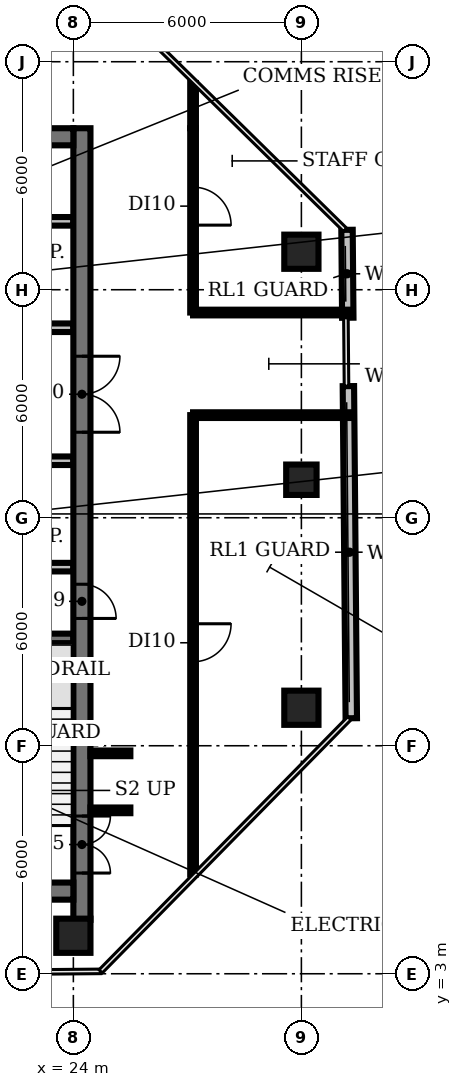
"""IFC4 building model, lengths in metres.
Left out: names, types, materials, properties, quantities, classifications, styles, units other than length and angle.
Written with IfcOpenShell. Run it as: python <this file> out.ifc"""

import sys

from ifc_helpers import new_model, si_unit, direction, frame, frame_2d, origin, origin_2d, place, context, subcontext, project, spatial, rectangle, circle, extrude, element, fill, save


model = new_model("IFC4")
c1 = context("Model", 3, precision=1e-05, world=origin(), true_north=direction((0.0, 1.0)))
c2 = subcontext(c1, "Body", "Model", "MODEL_VIEW")
j1 = project(units=[si_unit("LENGTHUNIT", "METRE"), si_unit("PLANEANGLEUNIT", "RADIAN")], contexts=[c1])
p1 = place(None, origin())
s1 = spatial("IfcSite", under=j1, at=p1, CompositionType="ELEMENT")
p2 = place(p1, origin())
s2 = spatial("IfcBuilding", under=s1, at=p2, CompositionType="ELEMENT")
p3 = place(p2, frame((0.0, 0.0, 226.4)))
s3 = spatial("IfcBuildingStorey", under=s2, at=p3, CompositionType="ELEMENT", Elevation=226.4)
for number, where, z_axis, x_axis in (
    (1, (24.0, 4.0, 0.0), (0.0, 0.0, 1.0), (1.0, 0.0, 0.0)),
    (2, (30.0, 10.0, 0.0), (0.0, 0.0, 1.0), (1.0, 0.0, 0.0)),
):
    element("IfcColumn", number, at=place(p3, frame(where, z_axis=z_axis, x_axis=x_axis)), inside=s3, PredefinedType="COLUMN", context=c2, shape_type="SweptSolid", body=[
        extrude(circle(Radius=0.45, at=origin_2d()), origin(), (0.0, 0.0, 1.0), 3.85),
    ])
p4 = place(p3, frame((30.0, 16.0, 0.0), z_axis=(0.0, 0.0, 1.0), x_axis=(1.0, 0.0, 0.0)))
e3 = element("IfcColumn", 3, at=p4, inside=s3, PredefinedType="COLUMN", context=c2, shape_type="SweptSolid", body=[
    extrude(rectangle(XDim=0.8, YDim=0.8, at=origin_2d()), origin(), (0.0, 0.0, 1.0), 3.85),
])
p5 = place(p3, frame((30.0, 22.0, 0.0), z_axis=(0.0, 0.0, 1.0), x_axis=(1.0, 0.0, 0.0)))
e4 = element("IfcColumn", 4, at=p5, inside=s3, PredefinedType="COLUMN", context=c2, shape_type="SweptSolid", body=[
    extrude(circle(Radius=0.45, at=origin_2d()), origin(), (0.0, 0.0, 1.0), 3.85),
])
p6 = place(p3, frame((31.313, 9.724, 0.0), z_axis=(0.0, 0.0, 1.0), x_axis=(-0.008715239699, 0.999962021577, 0.0)))
e5 = element("IfcWall", 5, at=p6, inside=s3, PredefinedType="SOLIDWALL", context=c2, shape_type="SweptSolid", body=[
    extrude(rectangle(XDim=8.74, YDim=0.3, at=frame_2d((4.37, 0.0))), origin(), (0.0, 0.0, 1.0), 3.85),
])
p7 = place(p3, frame((31.221, 20.263, 0.0), z_axis=(0.0, 0.0, 1.0), x_axis=(-0.008654029484, 0.999962553186, 0.0)))
e6 = element("IfcWall", 6, at=p7, inside=s3, PredefinedType="SOLIDWALL", context=c2, shape_type="SweptSolid", body=[
    extrude(rectangle(XDim=2.313, YDim=0.3, at=frame_2d((1.157, 0.0))), origin(), (0.0, 0.0, 1.0), 3.85),
])
p8 = place(p3, frame((20.85, 11.825, 0.0), z_axis=(0.0, 0.0, 1.0), x_axis=(1.0, 0.0, 0.0)))
e7 = element("IfcWall", 7, at=p8, inside=s3, PredefinedType="SHEAR", context=c2, shape_type="SweptSolid", body=[
    extrude(rectangle(XDim=3.15, YDim=0.25, at=frame_2d((1.575, 0.0))), origin(), (0.0, 0.0, 1.0), 3.85),
])
p9 = place(p3, frame((16.6, 13.7, 0.0), z_axis=(0.0, 0.0, 1.0), x_axis=(1.0, 0.0, 0.0)))
e8 = element("IfcWall", 8, at=p9, inside=s3, PredefinedType="PARTITIONING", context=c2, shape_type="SweptSolid", body=[
    extrude(rectangle(XDim=7.4, YDim=0.225, at=frame_2d((3.7, 0.0))), origin(), (0.0, 0.0, 1.0), 3.85),
])
p10 = place(p3, frame((9.4, 16.5, 0.0), z_axis=(0.0, 0.0, 1.0), x_axis=(1.0, 0.0, 0.0)))
e9 = element("IfcWall", 9, at=p10, inside=s3, PredefinedType="PARTITIONING", context=c2, shape_type="SweptSolid", body=[
    extrude(rectangle(XDim=14.6, YDim=0.225, at=frame_2d((7.3, 0.0))), origin(), (0.0, 0.0, 1.0), 3.85),
])
p11 = place(p10, frame((0.85, 0.0, 0.0)))
e10 = element("IfcOpeningElement", 10, at=p11, cuts=e9, PredefinedType="OPENING", context=c2, shape_type="SweptSolid", body=[
    extrude(rectangle(XDim=0.9, YDim=2.1, at=frame_2d((0.45, 1.05))), frame((0.0, 0.123, 0.0), z_axis=(0.0, -1.0, 0.0), x_axis=(1.0, 0.0, 0.0)), (0.0, 0.0, 1.0), 0.245),
])
p12 = place(p10, frame((3.625, 0.0, 0.0)))
e11 = element("IfcOpeningElement", 11, at=p12, cuts=e9, PredefinedType="OPENING", context=c2, shape_type="SweptSolid", body=[
    extrude(rectangle(XDim=0.9, YDim=2.1, at=frame_2d((0.45, 1.05))), frame((0.0, 0.123, 0.0), z_axis=(0.0, -1.0, 0.0), x_axis=(1.0, 0.0, 0.0)), (0.0, 0.0, 1.0), 0.245),
])
p13 = place(p10, frame((7.775, 0.0, 0.0)))
e12 = element("IfcOpeningElement", 12, at=p13, cuts=e9, PredefinedType="OPENING", context=c2, shape_type="SweptSolid", body=[
    extrude(rectangle(XDim=1.0, YDim=2.1, at=frame_2d((0.5, 1.05))), frame((0.0, 0.123, 0.0), z_axis=(0.0, -1.0, 0.0), x_axis=(1.0, 0.0, 0.0)), (0.0, 0.0, 1.0), 0.245),
])
p14 = place(p10, frame((12.4, 0.0, 0.0)))
e13 = element("IfcOpeningElement", 13, at=p14, cuts=e9, PredefinedType="OPENING", context=c2, shape_type="SweptSolid", body=[
    extrude(rectangle(XDim=1.0, YDim=2.1, at=frame_2d((0.5, 1.05))), frame((0.0, 0.123, 0.0), z_axis=(0.0, -1.0, 0.0), x_axis=(1.0, 0.0, 0.0)), (0.0, 0.0, 1.0), 0.245),
])
p15 = place(p3, frame((24.0, 20.0, 0.0), z_axis=(0.0, 0.0, 1.0), x_axis=(-1.0, 0.0, 0.0)))
e14 = element("IfcWall", 14, at=p15, inside=s3, PredefinedType="PARTITIONING", context=c2, shape_type="SweptSolid", body=[
    extrude(rectangle(XDim=14.6, YDim=0.225, at=frame_2d((7.3, 0.0))), origin(), (0.0, 0.0, 1.0), 3.85),
])
p16 = place(p15, frame((12.75, 0.0, 0.0)))
e15 = element("IfcOpeningElement", 15, at=p16, cuts=e14, PredefinedType="OPENING", context=c2, shape_type="SweptSolid", body=[
    extrude(rectangle(XDim=1.1, YDim=2.1, at=frame_2d((0.55, 1.05))), frame((0.0, 0.123, 0.0), z_axis=(0.0, -1.0, 0.0), x_axis=(1.0, 0.0, 0.0)), (0.0, 0.0, 1.0), 0.245),
])
p17 = place(p15, frame((9.95, 0.0, 0.0)))
e16 = element("IfcOpeningElement", 16, at=p17, cuts=e14, PredefinedType="OPENING", context=c2, shape_type="SweptSolid", body=[
    extrude(rectangle(XDim=1.1, YDim=2.1, at=frame_2d((0.55, 1.05))), frame((0.0, 0.123, 0.0), z_axis=(0.0, -1.0, 0.0), x_axis=(1.0, 0.0, 0.0)), (0.0, 0.0, 1.0), 0.245),
])
p18 = place(p15, frame((7.15, 0.0, 0.0)))
e17 = element("IfcOpeningElement", 17, at=p18, cuts=e14, PredefinedType="OPENING", context=c2, shape_type="SweptSolid", body=[
    extrude(rectangle(XDim=1.1, YDim=2.1, at=frame_2d((0.55, 1.05))), frame((0.0, 0.123, 0.0), z_axis=(0.0, -1.0, 0.0), x_axis=(1.0, 0.0, 0.0)), (0.0, 0.0, 1.0), 0.245),
])
p19 = place(p15, frame((4.35, 0.0, 0.0)))
e18 = element("IfcOpeningElement", 18, at=p19, cuts=e14, PredefinedType="OPENING", context=c2, shape_type="SweptSolid", body=[
    extrude(rectangle(XDim=1.1, YDim=2.1, at=frame_2d((0.55, 1.05))), frame((0.0, 0.123, 0.0), z_axis=(0.0, -1.0, 0.0), x_axis=(1.0, 0.0, 0.0)), (0.0, 0.0, 1.0), 0.245),
])
p20 = place(p15, frame((1.2, 0.0, 0.0)))
e19 = element("IfcOpeningElement", 19, at=p20, cuts=e14, PredefinedType="OPENING", context=c2, shape_type="SweptSolid", body=[
    extrude(rectangle(XDim=1.0, YDim=2.1, at=frame_2d((0.5, 1.05))), frame((0.0, 0.123, 0.0), z_axis=(0.0, -1.0, 0.0), x_axis=(1.0, 0.0, 0.0)), (0.0, 0.0, 1.0), 0.245),
])
p21 = place(p3, frame((9.4, 22.8, 0.0), z_axis=(0.0, 0.0, 1.0), x_axis=(1.0, 0.0, 0.0)))
e20 = element("IfcWall", 20, at=p21, inside=s3, PredefinedType="PARTITIONING", context=c2, shape_type="SweptSolid", body=[
    extrude(rectangle(XDim=14.6, YDim=0.225, at=frame_2d((7.3, 0.0))), origin(), (0.0, 0.0, 1.0), 3.85),
])
p22 = place(p3, frame((24.225, 25.25, 0.0), z_axis=(0.0, 0.0, 1.0), x_axis=(0.0, -1.0, 0.0)))
e21 = element("IfcWall", 21, at=p22, inside=s3, PredefinedType="SHEAR", context=c2, shape_type="SweptSolid", body=[
    extrude(rectangle(XDim=20.83, YDim=0.45, at=frame_2d((10.415, 0.0))), origin(), (0.0, 0.0, 1.0), 3.85),
])
p23 = place(p22, frame((18.1, 0.0, 0.0)))
e22 = element("IfcOpeningElement", 22, at=p23, cuts=e21, PredefinedType="OPENING", context=c2, shape_type="SweptSolid", body=[
    extrude(rectangle(XDim=1.5, YDim=2.1, at=frame_2d((0.75, 1.05))), frame((0.0, 0.235, 0.0), z_axis=(0.0, -1.0, 0.0), x_axis=(1.0, 0.0, 0.0)), (0.0, 0.0, 1.0), 0.47),
])
p24 = place(p22, frame((12.0, 0.0, 0.0)))
e23 = element("IfcOpeningElement", 23, at=p24, cuts=e21, PredefinedType="OPENING", context=c2, shape_type="SweptSolid", body=[
    extrude(rectangle(XDim=0.9, YDim=2.1, at=frame_2d((0.45, 1.05))), frame((0.0, 0.235, 0.0), z_axis=(0.0, -1.0, 0.0), x_axis=(1.0, 0.0, 0.0)), (0.0, 0.0, 1.0), 0.47),
])
p25 = place(p22, frame((6.0, 0.0, 0.0)))
e24 = element("IfcOpeningElement", 24, at=p25, cuts=e21, PredefinedType="OPENING", context=c2, shape_type="SweptSolid", body=[
    extrude(rectangle(XDim=2.0, YDim=2.1, at=frame_2d((1.0, 1.05))), frame((0.0, 0.235, 0.0), z_axis=(0.0, -1.0, 0.0), x_axis=(1.0, 0.0, 0.0)), (0.0, 0.0, 1.0), 0.47),
])
p26 = place(p3, frame((24.0, 5.175, 0.0), z_axis=(0.0, 0.0, 1.0), x_axis=(-1.0, 0.0, 0.0)))
e25 = element("IfcWall", 25, at=p26, inside=s3, PredefinedType="SHEAR", context=c2, shape_type="SweptSolid", body=[
    extrude(rectangle(XDim=18.0, YDim=0.45, at=frame_2d((9.0, 0.0))), origin(), (0.0, 0.0, 1.0), 3.85),
])
p27 = place(p26, frame((0.825, 0.0, 0.0)))
e26 = element("IfcOpeningElement", 26, at=p27, cuts=e25, PredefinedType="OPENING", context=c2, shape_type="SweptSolid", body=[
    extrude(rectangle(XDim=1.5, YDim=2.1, at=frame_2d((0.75, 1.05))), frame((0.0, 0.235, 0.0), z_axis=(0.0, -1.0, 0.0), x_axis=(1.0, 0.0, 0.0)), (0.0, 0.0, 1.0), 0.47),
])
p28 = place(p26, frame((15.675, 0.0, 0.0)))
e27 = element("IfcOpeningElement", 27, at=p28, cuts=e25, PredefinedType="OPENING", context=c2, shape_type="SweptSolid", body=[
    extrude(rectangle(XDim=1.5, YDim=2.1, at=frame_2d((0.75, 1.05))), frame((0.0, 0.235, 0.0), z_axis=(0.0, -1.0, 0.0), x_axis=(1.0, 0.0, 0.0)), (0.0, 0.0, 1.0), 0.47),
])
p29 = place(p26, frame((13.0, 0.0, 0.0)))
e28 = element("IfcOpeningElement", 28, at=p29, cuts=e25, PredefinedType="OPENING", context=c2, shape_type="SweptSolid", body=[
    extrude(rectangle(XDim=1.2, YDim=2.1, at=frame_2d((0.6, 1.05))), frame((0.0, 0.235, 0.0), z_axis=(0.0, -1.0, 0.0), x_axis=(1.0, 0.0, 0.0)), (0.0, 0.0, 1.0), 0.47),
])
p30 = place(p26, frame((4.4, 0.0, 0.0)))
e29 = element("IfcOpeningElement", 29, at=p30, cuts=e25, PredefinedType="OPENING", context=c2, shape_type="SweptSolid", body=[
    extrude(rectangle(XDim=1.0, YDim=2.1, at=frame_2d((0.5, 1.05))), frame((0.0, 0.235, 0.0), z_axis=(0.0, -1.0, 0.0), x_axis=(1.0, 0.0, 0.0)), (0.0, 0.0, 1.0), 0.47),
])
p31 = place(p3, frame((6.0, 25.025, 0.0), z_axis=(0.0, 0.0, 1.0), x_axis=(1.0, 0.0, 0.0)))
e30 = element("IfcWall", 30, at=p31, inside=s3, PredefinedType="SHEAR", context=c2, shape_type="SweptSolid", body=[
    extrude(rectangle(XDim=18.0, YDim=0.45, at=frame_2d((9.0, 0.0))), origin(), (0.0, 0.0, 1.0), 3.85),
])
for number, where, z_axis, x_axis in (
    (31, (24.45, 7.3, 0.0), (0.0, 0.0, 1.0), (1.0, 0.0, 0.0)),
    (32, (24.45, 8.8, 0.0), (0.0, 0.0, 1.0), (1.0, 0.0, 0.0)),
):
    element("IfcWall", number, at=place(p3, frame(where, z_axis=z_axis, x_axis=x_axis)), inside=s3, PredefinedType="PARTITIONING", context=c2, shape_type="SweptSolid", body=[
        extrude(rectangle(XDim=1.05, YDim=0.15, at=frame_2d((0.525, 0.0))), origin(), (0.0, 0.0, 1.0), 2.88),
    ])
p32 = place(p3, frame((27.15, 17.7, 0.0), z_axis=(0.0, 0.0, 1.0), x_axis=(0.0, -1.0, 0.0)))
e33 = element("IfcWall", 33, at=p32, inside=s3, PredefinedType="PARTITIONING", context=c2, shape_type="SweptSolid", body=[
    extrude(rectangle(XDim=12.09, YDim=0.15, at=frame_2d((6.045, 0.0))), origin(), (0.0, 0.0, 1.0), 2.88),
])
p33 = place(p32, frame((5.49, 0.0, 0.0)))
e34 = element("IfcOpeningElement", 34, at=p33, cuts=e33, PredefinedType="OPENING", context=c2, shape_type="SweptSolid", body=[
    extrude(rectangle(XDim=1.0, YDim=2.1, at=frame_2d((0.5, 1.05))), frame((0.0, 0.085, 0.0), z_axis=(0.0, -1.0, 0.0), x_axis=(1.0, 0.0, 0.0)), (0.0, 0.0, 1.0), 0.17),
])
p34 = place(p3, frame((27.15, 17.7, 0.0), z_axis=(0.0, 0.0, 1.0), x_axis=(1.0, 0.0, 0.0)))
e35 = element("IfcWall", 35, at=p34, inside=s3, PredefinedType="PARTITIONING", context=c2, shape_type="SweptSolid", body=[
    extrude(rectangle(XDim=4.104, YDim=0.15, at=frame_2d((2.052, 0.0))), origin(), (0.0, 0.0, 1.0), 2.88),
])
p35 = place(p3, frame((27.15, 20.4, 0.0), z_axis=(0.0, 0.0, 1.0), x_axis=(1.0, 0.0, 0.0)))
e36 = element("IfcWall", 36, at=p35, inside=s3, PredefinedType="PARTITIONING", context=c2, shape_type="SweptSolid", body=[
    extrude(rectangle(XDim=4.08, YDim=0.15, at=frame_2d((2.04, 0.0))), origin(), (0.0, 0.0, 1.0), 2.88),
])
p36 = place(p3, frame((27.15, 25.25, 0.0), z_axis=(0.0, 0.0, 1.0), x_axis=(0.0, -1.0, 0.0)))
e37 = element("IfcWall", 37, at=p36, inside=s3, PredefinedType="PARTITIONING", context=c2, shape_type="SweptSolid", body=[
    extrude(rectangle(XDim=4.85, YDim=0.15, at=frame_2d((2.425, 0.0))), origin(), (0.0, 0.0, 1.0), 2.88),
])
p37 = place(p36, frame((1.55, 0.0, 0.0)))
e38 = element("IfcOpeningElement", 38, at=p37, cuts=e37, PredefinedType="OPENING", context=c2, shape_type="SweptSolid", body=[
    extrude(rectangle(XDim=1.0, YDim=2.1, at=frame_2d((0.5, 1.05))), frame((0.0, 0.085, 0.0), z_axis=(0.0, -1.0, 0.0), x_axis=(1.0, 0.0, 0.0)), (0.0, 0.0, 1.0), 0.17),
])
p38 = place(p3, frame((27.15, 25.25, 0.0), z_axis=(0.0, 0.0, 1.0), x_axis=(0.0, 1.0, 0.0)))
e39 = element("IfcWall", 39, at=p38, inside=s3, PredefinedType="PARTITIONING", context=c2, shape_type="SweptSolid", body=[
    extrude(rectangle(XDim=1.19, YDim=0.15, at=frame_2d((0.595, 0.0))), origin(), (0.0, 0.0, 1.0), 2.88),
])
p39 = place(p23, origin())
e40 = element("IfcDoor", 40, at=p39, inside=s3, OperationType="DOUBLE_DOOR_SINGLE_SWING", PredefinedType="DOOR", context=c2, shape_type="SweptSolid", body=[
    extrude(rectangle(XDim=1.5, YDim=2.1, at=frame_2d((0.75, 1.05))), frame((0.0, 0.025, 0.0), z_axis=(0.0, -1.0, 0.0), x_axis=(1.0, 0.0, 0.0)), (0.0, 0.0, 1.0), 0.05),
])
fill(e22, e40)
p40 = place(p24, origin())
e41 = element("IfcDoor", 41, at=p40, inside=s3, OperationType="SINGLE_SWING_RIGHT", PredefinedType="DOOR", context=c2, shape_type="SweptSolid", body=[
    extrude(rectangle(XDim=0.9, YDim=2.1, at=frame_2d((0.45, 1.05))), frame((0.0, 0.025, 0.0), z_axis=(0.0, -1.0, 0.0), x_axis=(1.0, 0.0, 0.0)), (0.0, 0.0, 1.0), 0.05),
])
fill(e23, e41)
p41 = place(p25, origin())
e42 = element("IfcDoor", 42, at=p41, inside=s3, OperationType="DOUBLE_DOOR_SINGLE_SWING", PredefinedType="DOOR", context=c2, shape_type="SweptSolid", body=[
    extrude(rectangle(XDim=2.0, YDim=2.1, at=frame_2d((1.0, 1.05))), frame((0.0, 0.025, 0.0), z_axis=(0.0, -1.0, 0.0), x_axis=(1.0, 0.0, 0.0)), (0.0, 0.0, 1.0), 0.05),
])
fill(e24, e42)
p42 = place(p33, origin())
e43 = element("IfcDoor", 43, at=p42, inside=s3, OperationType="SINGLE_SWING_LEFT", PredefinedType="DOOR", context=c2, shape_type="SweptSolid", body=[
    extrude(rectangle(XDim=1.0, YDim=2.1, at=frame_2d((0.5, 1.05))), frame((0.0, 0.025, 0.0), z_axis=(0.0, -1.0, 0.0), x_axis=(1.0, 0.0, 0.0)), (0.0, 0.0, 1.0), 0.05),
])
fill(e34, e43)
p43 = place(p37, origin())
e44 = element("IfcDoor", 44, at=p43, inside=s3, OperationType="SINGLE_SWING_RIGHT", PredefinedType="DOOR", context=c2, shape_type="SweptSolid", body=[
    extrude(rectangle(XDim=1.0, YDim=2.1, at=frame_2d((0.5, 1.05))), frame((0.0, 0.025, 0.0), z_axis=(0.0, -1.0, 0.0), x_axis=(1.0, 0.0, 0.0)), (0.0, 0.0, 1.0), 0.05),
])
fill(e38, e44)
save(model, sys.argv[1])
